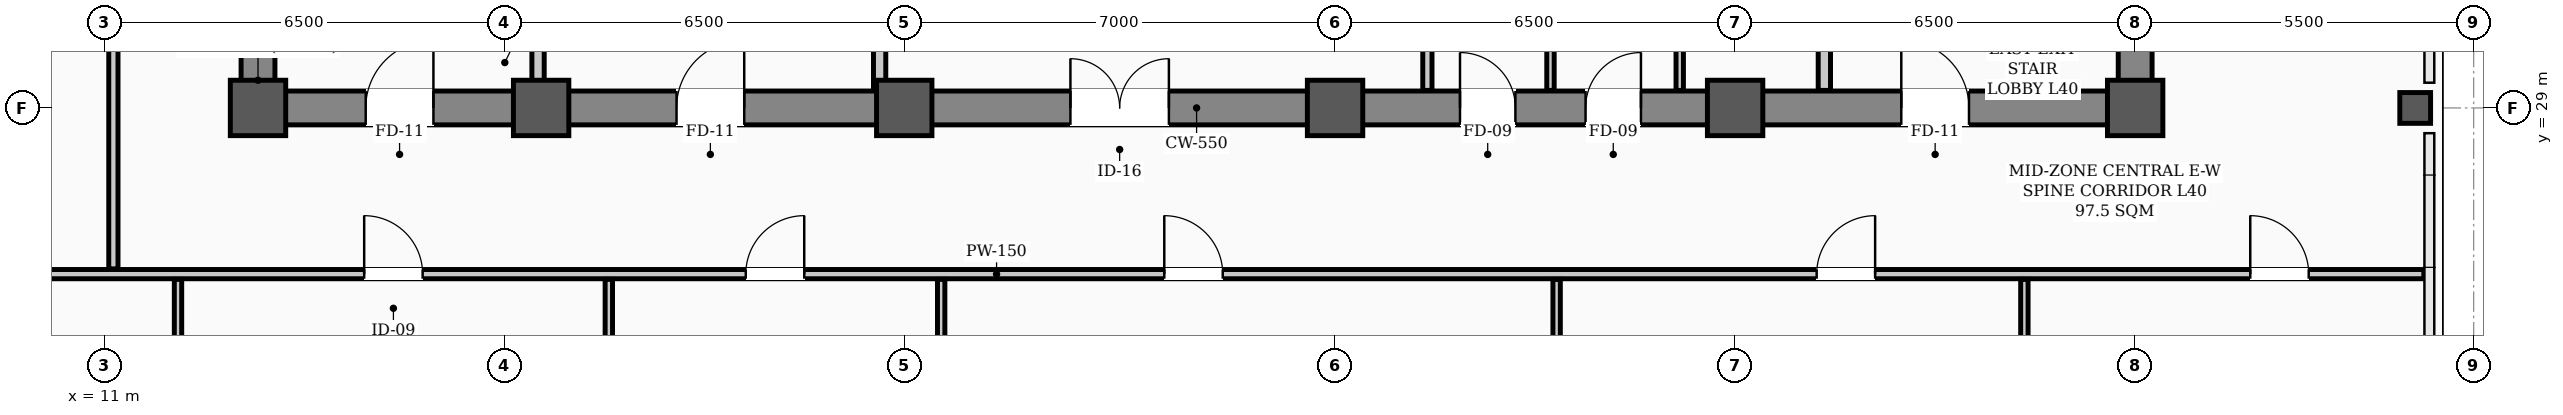
"""IFC4 building model, lengths in metres.
Left out: names, types, materials, properties, quantities, classifications, styles, units other than length and angle.
Written with IfcOpenShell. Run it as: python <this file> out.ifc"""

import sys

from ifc_helpers import new_model, si_unit, direction, frame, frame_2d, origin, origin_2d, place, context, subcontext, project, spatial, rectangle, hollow_rectangle, extrude, element, fill, save


model = new_model("IFC4")
c1 = context("Model", 3, precision=1e-05, world=origin(), true_north=direction((0.0, 1.0)))
c2 = subcontext(c1, "Body", "Model", "MODEL_VIEW")
j1 = project(units=[si_unit("LENGTHUNIT", "METRE"), si_unit("PLANEANGLEUNIT", "RADIAN")], contexts=[c1])
p1 = place(None, origin())
s1 = spatial("IfcSite", under=j1, at=p1, CompositionType="ELEMENT")
p2 = place(p1, origin())
s2 = spatial("IfcBuilding", under=s1, at=p2, CompositionType="ELEMENT")
p3 = place(p2, frame((0.0, 0.0, 161.7)))
s3 = spatial("IfcBuildingStorey", under=s2, at=p3, CompositionType="ELEMENT", Elevation=161.7)
for number, where, z_axis, x_axis in (
    (1, (13.5, 29.0, 0.0), (0.0, 0.0, 1.0), (1.0, 0.0, 0.0)),
    (2, (18.1, 29.0, 0.0), (0.0, 0.0, 1.0), (1.0, 0.0, 0.0)),
    (3, (24.0, 29.0, 0.0), (0.0, 0.0, 1.0), (1.0, 0.0, 0.0)),
    (4, (31.0, 29.0, 0.0), (0.0, 0.0, 1.0), (1.0, 0.0, 0.0)),
    (5, (37.5, 29.0, 0.0), (0.0, 0.0, 1.0), (1.0, 0.0, 0.0)),
    (6, (44.0, 29.0, 0.0), (0.0, 0.0, 1.0), (1.0, 0.0, 0.0)),
):
    element("IfcColumn", number, at=place(p3, frame(where, z_axis=z_axis, x_axis=x_axis)), inside=s3, PredefinedType="COLUMN", context=c2, shape_type="SweptSolid", body=[
        extrude(hollow_rectangle(XDim=0.9, YDim=0.9, WallThickness=0.035, InnerFilletRadius=0.017, OuterFilletRadius=0.052, at=origin_2d()), origin(), (0.0, 0.0, 1.0), 3.9),
    ])
p4 = place(p3, frame((48.55, 29.0, 0.0), z_axis=(0.0, 0.0, 1.0), x_axis=(1.0, 0.0, 0.0)))
e7 = element("IfcColumn", 7, at=p4, inside=s3, PredefinedType="COLUMN", context=c2, shape_type="SweptSolid", body=[
    extrude(hollow_rectangle(XDim=0.5, YDim=0.5, WallThickness=0.024, InnerFilletRadius=0.012, OuterFilletRadius=0.036, at=origin_2d()), origin(), (0.0, 0.0, 1.0), 3.9),
])
p5 = place(p3, frame((13.5, 29.0, 0.0), z_axis=(0.0, 0.0, 1.0), x_axis=(1.0, 0.0, 0.0)))
e8 = element("IfcWall", 8, at=p5, inside=s3, PredefinedType="SHEAR", context=c2, shape_type="SweptSolid", body=[
    extrude(rectangle(XDim=30.5, YDim=0.55, at=frame_2d((15.25, 0.0))), origin(), (0.0, 0.0, 1.0), 3.72),
])
p6 = place(p5, frame((1.75, 0.0, 0.0)))
e9 = element("IfcOpeningElement", 9, at=p6, cuts=e8, PredefinedType="OPENING", context=c2, shape_type="SweptSolid", body=[
    extrude(rectangle(XDim=1.1, YDim=2.08, at=frame_2d((0.55, 1.04))), frame((0.0, 0.285, 0.0), z_axis=(0.0, -1.0, 0.0), x_axis=(1.0, 0.0, 0.0)), (0.0, 0.0, 1.0), 0.57),
])
p7 = place(p5, frame((26.7, 0.0, 0.0)))
e10 = element("IfcOpeningElement", 10, at=p7, cuts=e8, PredefinedType="OPENING", context=c2, shape_type="SweptSolid", body=[
    extrude(rectangle(XDim=1.1, YDim=2.08, at=frame_2d((0.55, 1.04))), frame((0.0, 0.285, 0.0), z_axis=(0.0, -1.0, 0.0), x_axis=(1.0, 0.0, 0.0)), (0.0, 0.0, 1.0), 0.57),
])
p8 = place(p5, frame((6.8, 0.0, 0.0)))
e11 = element("IfcOpeningElement", 11, at=p8, cuts=e8, PredefinedType="OPENING", context=c2, shape_type="SweptSolid", body=[
    extrude(rectangle(XDim=1.1, YDim=2.08, at=frame_2d((0.55, 1.04))), frame((0.0, 0.285, 0.0), z_axis=(0.0, -1.0, 0.0), x_axis=(1.0, 0.0, 0.0)), (0.0, 0.0, 1.0), 0.57),
])
p9 = place(p5, frame((13.2, 0.0, 0.0)))
e12 = element("IfcOpeningElement", 12, at=p9, cuts=e8, PredefinedType="OPENING", context=c2, shape_type="SweptSolid", body=[
    extrude(rectangle(XDim=1.6, YDim=2.08, at=frame_2d((0.8, 1.04))), frame((0.0, 0.285, 0.0), z_axis=(0.0, -1.0, 0.0), x_axis=(1.0, 0.0, 0.0)), (0.0, 0.0, 1.0), 0.57),
])
p10 = place(p5, frame((19.53, 0.0, 0.0)))
e13 = element("IfcOpeningElement", 13, at=p10, cuts=e8, PredefinedType="OPENING", context=c2, shape_type="SweptSolid", body=[
    extrude(rectangle(XDim=0.9, YDim=2.08, at=frame_2d((0.45, 1.04))), frame((0.0, 0.285, 0.0), z_axis=(0.0, -1.0, 0.0), x_axis=(1.0, 0.0, 0.0)), (0.0, 0.0, 1.0), 0.57),
])
p11 = place(p5, frame((21.57, 0.0, 0.0)))
e14 = element("IfcOpeningElement", 14, at=p11, cuts=e8, PredefinedType="OPENING", context=c2, shape_type="SweptSolid", body=[
    extrude(rectangle(XDim=0.9, YDim=2.08, at=frame_2d((0.45, 1.04))), frame((0.0, 0.285, 0.0), z_axis=(0.0, -1.0, 0.0), x_axis=(1.0, 0.0, 0.0)), (0.0, 0.0, 1.0), 0.57),
])
for number, where, z_axis, x_axis in (
    (15, (13.5, 29.35, 0.0), (0.0, 0.0, 1.0), (0.0, 1.0, 0.0)),
    (16, (44.0, 29.35, 0.0), (0.0, 0.0, 1.0), (0.0, 1.0, 0.0)),
):
    element("IfcWall", number, at=place(p3, frame(where, z_axis=z_axis, x_axis=x_axis)), inside=s3, PredefinedType="SHEAR", context=c2, shape_type="SweptSolid", body=[
        extrude(rectangle(XDim=8.6, YDim=0.55, at=frame_2d((4.3, 0.0))), origin(), (0.0, 0.0, 1.0), 3.72),
    ])
p12 = place(p3, frame((2.31, 26.3, 0.0), z_axis=(0.0, 0.0, 1.0), x_axis=(1.0, 0.0, 0.0)))
e17 = element("IfcWall", 17, at=p12, inside=s3, PredefinedType="PARTITIONING", context=c2, shape_type="SweptSolid", body=[
    extrude(rectangle(XDim=46.38, YDim=0.15, at=frame_2d((23.19, 0.0))), origin(), (0.0, 0.0, 1.0), 3.2),
])
p13 = place(p12, frame((12.915, 0.0, 0.0)))
e18 = element("IfcOpeningElement", 18, at=p13, cuts=e17, PredefinedType="OPENING", context=c2, shape_type="SweptSolid", body=[
    extrude(rectangle(XDim=0.95, YDim=2.08, at=frame_2d((0.475, 1.04))), frame((0.0, 0.085, 0.0), z_axis=(0.0, -1.0, 0.0), x_axis=(1.0, 0.0, 0.0)), (0.0, 0.0, 1.0), 0.17),
])
p14 = place(p12, frame((19.115, 0.0, 0.0)))
e19 = element("IfcOpeningElement", 19, at=p14, cuts=e17, PredefinedType="OPENING", context=c2, shape_type="SweptSolid", body=[
    extrude(rectangle(XDim=0.95, YDim=2.08, at=frame_2d((0.475, 1.04))), frame((0.0, 0.085, 0.0), z_axis=(0.0, -1.0, 0.0), x_axis=(1.0, 0.0, 0.0)), (0.0, 0.0, 1.0), 0.17),
])
p15 = place(p12, frame((25.915, 0.0, 0.0)))
e20 = element("IfcOpeningElement", 20, at=p15, cuts=e17, PredefinedType="OPENING", context=c2, shape_type="SweptSolid", body=[
    extrude(rectangle(XDim=0.95, YDim=2.08, at=frame_2d((0.475, 1.04))), frame((0.0, 0.085, 0.0), z_axis=(0.0, -1.0, 0.0), x_axis=(1.0, 0.0, 0.0)), (0.0, 0.0, 1.0), 0.17),
])
p16 = place(p12, frame((36.515, 0.0, 0.0)))
e21 = element("IfcOpeningElement", 21, at=p16, cuts=e17, PredefinedType="OPENING", context=c2, shape_type="SweptSolid", body=[
    extrude(rectangle(XDim=0.95, YDim=2.08, at=frame_2d((0.475, 1.04))), frame((0.0, 0.085, 0.0), z_axis=(0.0, -1.0, 0.0), x_axis=(1.0, 0.0, 0.0)), (0.0, 0.0, 1.0), 0.17),
])
p17 = place(p12, frame((43.56, 0.0, 0.0)))
e22 = element("IfcOpeningElement", 22, at=p17, cuts=e17, PredefinedType="OPENING", context=c2, shape_type="SweptSolid", body=[
    extrude(rectangle(XDim=0.95, YDim=2.08, at=frame_2d((0.475, 1.04))), frame((0.0, 0.085, 0.0), z_axis=(0.0, -1.0, 0.0), x_axis=(1.0, 0.0, 0.0)), (0.0, 0.0, 1.0), 0.17),
])
for number, where, z_axis, x_axis in (
    (23, (18.05, 29.285, 0.0), (0.0, 0.0, 1.0), (0.0, 1.0, 0.0)),
    (24, (38.95, 29.285, 0.0), (0.0, 0.0, 1.0), (0.0, 1.0, 0.0)),
):
    element("IfcWall", number, at=place(p3, frame(where, z_axis=z_axis, x_axis=x_axis)), inside=s3, PredefinedType="STANDARD", context=c2, shape_type="SweptSolid", body=[
        extrude(rectangle(XDim=1.015, YDim=0.2, at=frame_2d((0.508, 0.0))), origin(), (0.0, 0.0, 1.0), 3.35),
    ])
p18 = place(p3, frame((23.6, 29.285, 0.0), z_axis=(0.0, 0.0, 1.0), x_axis=(0.0, 1.0, 0.0)))
e25 = element("IfcWall", 25, at=p18, inside=s3, PredefinedType="STANDARD", context=c2, shape_type="SweptSolid", body=[
    extrude(rectangle(XDim=5.415, YDim=0.2, at=frame_2d((2.708, 0.0))), origin(), (0.0, 0.0, 1.0), 3.2),
])
p19 = place(p3, frame((32.5, 29.285, 0.0), z_axis=(0.0, 0.0, 1.0), x_axis=(0.0, 1.0, 0.0)))
e26 = element("IfcWall", 26, at=p19, inside=s3, PredefinedType="PARTITIONING", context=c2, shape_type="SweptSolid", body=[
    extrude(rectangle(XDim=2.48, YDim=0.15, at=frame_2d((1.24, 0.0))), origin(), (0.0, 0.0, 1.0), 3.35),
])
for number, where, z_axis, x_axis in (
    (27, (36.6, 29.285, 0.0), (0.0, 0.0, 1.0), (0.0, 1.0, 0.0)),
    (28, (34.5, 29.285, 0.0), (0.0, 0.0, 1.0), (0.0, 1.0, 0.0)),
):
    element("IfcWall", number, at=place(p3, frame(where, z_axis=z_axis, x_axis=x_axis)), inside=s3, PredefinedType="PARTITIONING", context=c2, shape_type="SweptSolid", body=[
        extrude(rectangle(XDim=2.48, YDim=0.12, at=frame_2d((1.24, 0.0))), origin(), (0.0, 0.0, 1.0), 3.35),
    ])
p20 = place(p3, frame((11.15, 26.385, 0.0), z_axis=(0.0, 0.0, 1.0), x_axis=(0.0, 1.0, 0.0)))
e29 = element("IfcWall", 29, at=p20, inside=s3, PredefinedType="PARTITIONING", context=c2, shape_type="SweptSolid", body=[
    extrude(rectangle(XDim=13.58, YDim=0.15, at=frame_2d((6.79, 0.0))), origin(), (0.0, 0.0, 1.0), 3.1),
])
p21 = place(p20, frame((6.315, 0.0, 0.0)))
e30 = element("IfcOpeningElement", 30, at=p21, cuts=e29, PredefinedType="OPENING", context=c2, shape_type="SweptSolid", body=[
    extrude(rectangle(XDim=0.95, YDim=2.08, at=frame_2d((0.475, 1.04))), frame((0.0, 0.085, 0.0), z_axis=(0.0, -1.0, 0.0), x_axis=(1.0, 0.0, 0.0)), (0.0, 0.0, 1.0), 0.17),
])
p22 = place(p3, frame((12.2, 16.31, 0.0), z_axis=(0.0, 0.0, 1.0), x_axis=(0.0, 1.0, 0.0)))
e31 = element("IfcWall", 31, at=p22, inside=s3, PredefinedType="PARTITIONING", context=c2, shape_type="SweptSolid", body=[
    extrude(rectangle(XDim=9.905, YDim=0.12, at=frame_2d((4.953, 0.0))), origin(), (0.0, 0.0, 1.0), 3.1),
])
p23 = place(p22, frame((7.915, 0.0, 0.0)))
e32 = element("IfcOpeningElement", 32, at=p23, cuts=e31, PredefinedType="OPENING", context=c2, shape_type="SweptSolid", body=[
    extrude(rectangle(XDim=0.95, YDim=2.08, at=frame_2d((0.475, 1.04))), frame((0.0, 0.07, 0.0), z_axis=(0.0, -1.0, 0.0), x_axis=(1.0, 0.0, 0.0)), (0.0, 0.0, 1.0), 0.14),
])
p24 = place(p3, frame((19.2, 16.31, 0.0), z_axis=(0.0, 0.0, 1.0), x_axis=(0.0, 1.0, 0.0)))
e33 = element("IfcWall", 33, at=p24, inside=s3, PredefinedType="PARTITIONING", context=c2, shape_type="SweptSolid", body=[
    extrude(rectangle(XDim=9.905, YDim=0.12, at=frame_2d((4.953, 0.0))), origin(), (0.0, 0.0, 1.0), 3.1),
])
p25 = place(p3, frame((24.6, 18.07, 0.0), z_axis=(0.0, 0.0, 1.0), x_axis=(0.0, 1.0, 0.0)))
e34 = element("IfcWall", 34, at=p25, inside=s3, PredefinedType="PARTITIONING", context=c2, shape_type="SweptSolid", body=[
    extrude(rectangle(XDim=8.145, YDim=0.12, at=frame_2d((4.073, 0.0))), origin(), (0.0, 0.0, 1.0), 3.1),
])
for number, where, z_axis, x_axis in (
    (35, (34.6, 16.31, 0.0), (0.0, 0.0, 1.0), (0.0, 1.0, 0.0)),
    (36, (42.2, 16.31, 0.0), (0.0, 0.0, 1.0), (0.0, 1.0, 0.0)),
):
    element("IfcWall", number, at=place(p3, frame(where, z_axis=z_axis, x_axis=x_axis)), inside=s3, PredefinedType="PARTITIONING", context=c2, shape_type="SweptSolid", body=[
        extrude(rectangle(XDim=9.905, YDim=0.12, at=frame_2d((4.953, 0.0))), origin(), (0.0, 0.0, 1.0), 3.1),
    ])
p26 = place(p6, origin())
e37 = element("IfcDoor", 37, at=p26, inside=s3, OperationType="SINGLE_SWING_RIGHT", PredefinedType="DOOR", context=c2, shape_type="SweptSolid", body=[
    extrude(rectangle(XDim=1.1, YDim=2.08, at=frame_2d((0.55, 1.04))), frame((0.0, 0.025, 0.0), z_axis=(0.0, -1.0, 0.0), x_axis=(1.0, 0.0, 0.0)), (0.0, 0.0, 1.0), 0.05),
])
fill(e9, e37)
p27 = place(p7, origin())
e38 = element("IfcDoor", 38, at=p27, inside=s3, OperationType="SINGLE_SWING_LEFT", PredefinedType="DOOR", context=c2, shape_type="SweptSolid", body=[
    extrude(rectangle(XDim=1.1, YDim=2.08, at=frame_2d((0.55, 1.04))), frame((0.0, 0.025, 0.0), z_axis=(0.0, -1.0, 0.0), x_axis=(1.0, 0.0, 0.0)), (0.0, 0.0, 1.0), 0.05),
])
fill(e10, e38)
p28 = place(p8, origin())
e39 = element("IfcDoor", 39, at=p28, inside=s3, OperationType="SINGLE_SWING_RIGHT", PredefinedType="DOOR", context=c2, shape_type="SweptSolid", body=[
    extrude(rectangle(XDim=1.1, YDim=2.08, at=frame_2d((0.55, 1.04))), frame((0.0, 0.025, 0.0), z_axis=(0.0, -1.0, 0.0), x_axis=(1.0, 0.0, 0.0)), (0.0, 0.0, 1.0), 0.05),
])
fill(e11, e39)
p29 = place(p9, origin())
e40 = element("IfcDoor", 40, at=p29, inside=s3, OperationType="DOUBLE_DOOR_SINGLE_SWING", PredefinedType="DOOR", context=c2, shape_type="SweptSolid", body=[
    extrude(rectangle(XDim=1.6, YDim=2.08, at=frame_2d((0.8, 1.04))), frame((0.0, 0.025, 0.0), z_axis=(0.0, -1.0, 0.0), x_axis=(1.0, 0.0, 0.0)), (0.0, 0.0, 1.0), 0.05),
])
fill(e12, e40)
p30 = place(p10, origin())
e41 = element("IfcDoor", 41, at=p30, inside=s3, OperationType="SINGLE_SWING_LEFT", PredefinedType="DOOR", context=c2, shape_type="SweptSolid", body=[
    extrude(rectangle(XDim=0.9, YDim=2.08, at=frame_2d((0.45, 1.04))), frame((0.0, 0.025, 0.0), z_axis=(0.0, -1.0, 0.0), x_axis=(1.0, 0.0, 0.0)), (0.0, 0.0, 1.0), 0.05),
])
fill(e13, e41)
p31 = place(p11, origin())
e42 = element("IfcDoor", 42, at=p31, inside=s3, OperationType="SINGLE_SWING_RIGHT", PredefinedType="DOOR", context=c2, shape_type="SweptSolid", body=[
    extrude(rectangle(XDim=0.9, YDim=2.08, at=frame_2d((0.45, 1.04))), frame((0.0, 0.025, 0.0), z_axis=(0.0, -1.0, 0.0), x_axis=(1.0, 0.0, 0.0)), (0.0, 0.0, 1.0), 0.05),
])
fill(e14, e42)
p32 = place(p13, origin())
e43 = element("IfcDoor", 43, at=p32, inside=s3, OperationType="SINGLE_SWING_LEFT", PredefinedType="DOOR", context=c2, shape_type="SweptSolid", body=[
    extrude(rectangle(XDim=0.95, YDim=2.08, at=frame_2d((0.475, 1.04))), frame((0.0, 0.025, 0.0), z_axis=(0.0, -1.0, 0.0), x_axis=(1.0, 0.0, 0.0)), (0.0, 0.0, 1.0), 0.05),
])
fill(e18, e43)
p33 = place(p14, origin())
e44 = element("IfcDoor", 44, at=p33, inside=s3, OperationType="SINGLE_SWING_RIGHT", PredefinedType="DOOR", context=c2, shape_type="SweptSolid", body=[
    extrude(rectangle(XDim=0.95, YDim=2.08, at=frame_2d((0.475, 1.04))), frame((0.0, 0.025, 0.0), z_axis=(0.0, -1.0, 0.0), x_axis=(1.0, 0.0, 0.0)), (0.0, 0.0, 1.0), 0.05),
])
fill(e19, e44)
p34 = place(p15, origin())
e45 = element("IfcDoor", 45, at=p34, inside=s3, OperationType="SINGLE_SWING_LEFT", PredefinedType="DOOR", context=c2, shape_type="SweptSolid", body=[
    extrude(rectangle(XDim=0.95, YDim=2.08, at=frame_2d((0.475, 1.04))), frame((0.0, 0.025, 0.0), z_axis=(0.0, -1.0, 0.0), x_axis=(1.0, 0.0, 0.0)), (0.0, 0.0, 1.0), 0.05),
])
fill(e20, e45)
p35 = place(p16, origin())
e46 = element("IfcDoor", 46, at=p35, inside=s3, OperationType="SINGLE_SWING_RIGHT", PredefinedType="DOOR", context=c2, shape_type="SweptSolid", body=[
    extrude(rectangle(XDim=0.95, YDim=2.08, at=frame_2d((0.475, 1.04))), frame((0.0, 0.025, 0.0), z_axis=(0.0, -1.0, 0.0), x_axis=(1.0, 0.0, 0.0)), (0.0, 0.0, 1.0), 0.05),
])
fill(e21, e46)
p36 = place(p17, origin())
e47 = element("IfcDoor", 47, at=p36, inside=s3, OperationType="SINGLE_SWING_LEFT", PredefinedType="DOOR", context=c2, shape_type="SweptSolid", body=[
    extrude(rectangle(XDim=0.95, YDim=2.08, at=frame_2d((0.475, 1.04))), frame((0.0, 0.025, 0.0), z_axis=(0.0, -1.0, 0.0), x_axis=(1.0, 0.0, 0.0)), (0.0, 0.0, 1.0), 0.05),
])
fill(e22, e47)
save(model, sys.argv[1])
